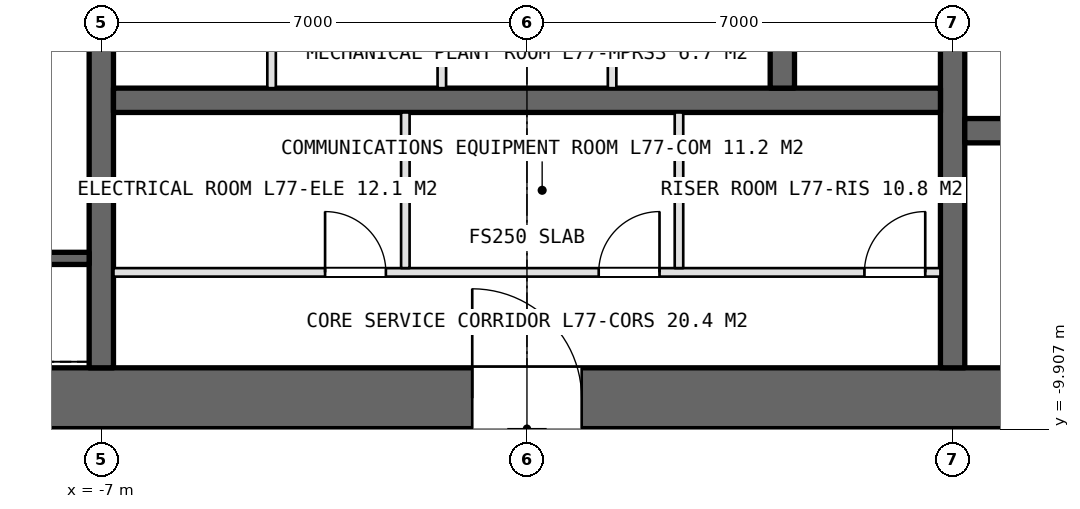
"""IFC4 building model, lengths in metres.
Left out: names, types, materials, properties, quantities, classifications, styles, units other than length and angle.
Written with IfcOpenShell. Run it as: python <this file> out.ifc"""

import sys

from ifc_helpers import new_model, si_unit, direction, frame, frame_2d, origin, place, context, subcontext, project, spatial, rectangle, extrude, element, fill, save


model = new_model("IFC4")
c1 = context("Model", 3, precision=1e-05, world=origin(), true_north=direction((0.0, 1.0)))
c2 = subcontext(c1, "Body", "Model", "MODEL_VIEW")
j1 = project(units=[si_unit("LENGTHUNIT", "METRE"), si_unit("PLANEANGLEUNIT", "RADIAN")], contexts=[c1])
p1 = place(None, origin())
s1 = spatial("IfcSite", under=j1, at=p1, CompositionType="ELEMENT")
p2 = place(p1, origin())
s2 = spatial("IfcBuilding", under=s1, at=p2, CompositionType="ELEMENT")
p3 = place(p2, frame((0.0, 0.0, 344.2)))
s3 = spatial("IfcBuildingStorey", under=s2, at=p3, CompositionType="ELEMENT", Elevation=344.2)
p4 = place(p3, frame((-13.9, -9.4, 0.0), z_axis=(0.0, 0.0, 1.0), x_axis=(1.0, 0.0, 0.0)))
e1 = element("IfcWall", 1, at=p4, inside=s3, PredefinedType="SHEAR", context=c2, shape_type="SweptSolid", body=[
    extrude(rectangle(XDim=27.8, YDim=1.0, at=frame_2d((13.9, 0.0))), origin(), (0.0, 0.0, 1.0), 5.0),
])
p5 = place(p4, frame((13.0, 0.0, 0.0)))
e2 = element("IfcOpeningElement", 2, at=p5, cuts=e1, PredefinedType="OPENING", context=c2, shape_type="SweptSolid", body=[
    extrude(rectangle(XDim=1.8, YDim=2.4, at=frame_2d((0.9, 1.2))), frame((0.0, 0.51, 0.0), z_axis=(0.0, -1.0, 0.0), x_axis=(1.0, 0.0, 0.0)), (0.0, 0.0, 1.0), 1.02),
])
p6 = place(p4, frame((22.95, 0.0, 0.0)))
e3 = element("IfcOpeningElement", 3, at=p6, cuts=e1, PredefinedType="OPENING", context=c2, shape_type="SweptSolid", body=[
    extrude(rectangle(XDim=2.2, YDim=2.7, at=frame_2d((1.1, 1.35))), frame((0.0, 0.51, 0.0), z_axis=(0.0, -1.0, 0.0), x_axis=(1.0, 0.0, 0.0)), (0.0, 0.0, 1.0), 1.02),
])
p7 = place(p3, frame((-7.0, -8.9, 0.0), z_axis=(0.0, 0.0, 1.0), x_axis=(0.0, 1.0, 0.0)))
e4 = element("IfcWall", 4, at=p7, inside=s3, PredefinedType="SHEAR", context=c2, shape_type="SweptSolid", body=[
    extrude(rectangle(XDim=17.8, YDim=0.4, at=frame_2d((8.9, 0.0))), origin(), (0.0, 0.0, 1.0), 5.0),
])
p8 = place(p7, frame((8.0, 0.0, 0.0)))
e5 = element("IfcOpeningElement", 5, at=p8, cuts=e4, PredefinedType="OPENING", context=c2, shape_type="SweptSolid", body=[
    extrude(rectangle(XDim=1.8, YDim=2.4, at=frame_2d((0.9, 1.2))), frame((0.0, 0.21, 0.0), z_axis=(0.0, -1.0, 0.0), x_axis=(1.0, 0.0, 0.0)), (0.0, 0.0, 1.0), 0.42),
])
p9 = place(p3, frame((7.0, -8.9, 0.0), z_axis=(0.0, 0.0, 1.0), x_axis=(0.0, 1.0, 0.0)))
e6 = element("IfcWall", 6, at=p9, inside=s3, PredefinedType="SHEAR", context=c2, shape_type="SweptSolid", body=[
    extrude(rectangle(XDim=17.8, YDim=0.4, at=frame_2d((8.9, 0.0))), origin(), (0.0, 0.0, 1.0), 5.0),
])
p10 = place(p9, frame((8.0, 0.0, 0.0)))
e7 = element("IfcOpeningElement", 7, at=p10, cuts=e6, PredefinedType="OPENING", context=c2, shape_type="SweptSolid", body=[
    extrude(rectangle(XDim=1.8, YDim=2.4, at=frame_2d((0.9, 1.2))), frame((0.0, 0.21, 0.0), z_axis=(0.0, -1.0, 0.0), x_axis=(1.0, 0.0, 0.0)), (0.0, 0.0, 1.0), 0.42),
])
p11 = place(p3, frame((-6.8, -4.5, 0.0), z_axis=(0.0, 0.0, 1.0), x_axis=(1.0, 0.0, 0.0)))
e8 = element("IfcWall", 8, at=p11, inside=s3, PredefinedType="SHEAR", context=c2, shape_type="SweptSolid", body=[
    extrude(rectangle(XDim=13.6, YDim=0.4, at=frame_2d((6.8, 0.0))), origin(), (0.0, 0.0, 1.0), 5.0),
])
p12 = place(p3, frame((7.2, -5.0, 0.0), z_axis=(0.0, 0.0, 1.0), x_axis=(1.0, 0.0, 0.0)))
e9 = element("IfcWall", 9, at=p12, inside=s3, PredefinedType="SHEAR", context=c2, shape_type="SweptSolid", body=[
    extrude(rectangle(XDim=5.7, YDim=0.4, at=frame_2d((2.85, 0.0))), origin(), (0.0, 0.0, 1.0), 5.0),
])
p13 = place(p3, frame((4.2, -4.3, 0.0), z_axis=(0.0, 0.0, 1.0), x_axis=(0.0, 1.0, 0.0)))
e10 = element("IfcWall", 10, at=p13, inside=s3, PredefinedType="SHEAR", context=c2, shape_type="SweptSolid", body=[
    extrude(rectangle(XDim=2.5, YDim=0.4, at=frame_2d((1.25, 0.0))), origin(), (0.0, 0.0, 1.0), 5.0),
])
p14 = place(p3, frame((-6.8, -7.33, 0.0), z_axis=(0.0, 0.0, 1.0), x_axis=(1.0, 0.0, 0.0)))
e11 = element("IfcWall", 11, at=p14, inside=s3, PredefinedType="PARTITIONING", context=c2, shape_type="SweptSolid", body=[
    extrude(rectangle(XDim=13.6, YDim=0.14, at=frame_2d((6.8, 0.0))), origin(), (0.0, 0.0, 1.0), 4.7),
])
p15 = place(p14, frame((3.48, 0.0, 0.0)))
e12 = element("IfcOpeningElement", 12, at=p15, cuts=e11, PredefinedType="OPENING", context=c2, shape_type="SweptSolid", body=[
    extrude(rectangle(XDim=1.0, YDim=2.4, at=frame_2d((0.5, 1.2))), frame((0.0, 0.08, 0.0), z_axis=(0.0, -1.0, 0.0), x_axis=(1.0, 0.0, 0.0)), (0.0, 0.0, 1.0), 0.16),
])
p16 = place(p14, frame((7.98, 0.0, 0.0)))
e13 = element("IfcOpeningElement", 13, at=p16, cuts=e11, PredefinedType="OPENING", context=c2, shape_type="SweptSolid", body=[
    extrude(rectangle(XDim=1.0, YDim=2.4, at=frame_2d((0.5, 1.2))), frame((0.0, 0.08, 0.0), z_axis=(0.0, -1.0, 0.0), x_axis=(1.0, 0.0, 0.0)), (0.0, 0.0, 1.0), 0.16),
])
p17 = place(p14, frame((12.35, 0.0, 0.0)))
e14 = element("IfcOpeningElement", 14, at=p17, cuts=e11, PredefinedType="OPENING", context=c2, shape_type="SweptSolid", body=[
    extrude(rectangle(XDim=1.0, YDim=2.4, at=frame_2d((0.5, 1.2))), frame((0.0, 0.08, 0.0), z_axis=(0.0, -1.0, 0.0), x_axis=(1.0, 0.0, 0.0)), (0.0, 0.0, 1.0), 0.16),
])
for number, where, z_axis, x_axis in (
    (15, (-2.0, -4.7, 0.0), (0.0, 0.0, 1.0), (0.0, -1.0, 0.0)),
    (16, (2.5, -4.7, 0.0), (0.0, 0.0, 1.0), (0.0, -1.0, 0.0)),
):
    element("IfcWall", number, at=place(p3, frame(where, z_axis=z_axis, x_axis=x_axis)), inside=s3, PredefinedType="PARTITIONING", context=c2, shape_type="SweptSolid", body=[
        extrude(rectangle(XDim=2.56, YDim=0.14, at=frame_2d((1.28, 0.0))), origin(), (0.0, 0.0, 1.0), 4.7),
    ])
for number, where, z_axis, x_axis in (
    (17, (-4.2, -1.8, 0.0), (0.0, 0.0, 1.0), (0.0, -1.0, 0.0)),
    (18, (-1.4, -1.8, 0.0), (0.0, 0.0, 1.0), (0.0, -1.0, 0.0)),
    (19, (1.4, -1.8, 0.0), (0.0, 0.0, 1.0), (0.0, -1.0, 0.0)),
):
    element("IfcWall", number, at=place(p3, frame(where, z_axis=z_axis, x_axis=x_axis)), inside=s3, PredefinedType="PARTITIONING", context=c2, shape_type="SweptSolid", body=[
        extrude(rectangle(XDim=2.5, YDim=0.14, at=frame_2d((1.25, 0.0))), origin(), (0.0, 0.0, 1.0), 4.7),
    ])
p18 = place(p3, frame((-9.15, -7.1, 0.0), z_axis=(0.0, 0.0, 1.0), x_axis=(1.0, 0.0, 0.0)))
e20 = element("IfcWall", 20, at=p18, inside=s3, PredefinedType="SOLIDWALL", context=c2, shape_type="SweptSolid", body=[
    extrude(rectangle(XDim=1.95, YDim=0.2, at=frame_2d((0.975, 0.0))), origin(), (0.0, 0.0, 1.0), 5.0),
])
p19 = place(p15, origin())
e21 = element("IfcDoor", 21, at=p19, inside=s3, OperationType="SINGLE_SWING_LEFT", PredefinedType="DOOR", context=c2, shape_type="SweptSolid", body=[
    extrude(rectangle(XDim=1.0, YDim=2.4, at=frame_2d((0.5, 1.2))), frame((0.0, 0.025, 0.0), z_axis=(0.0, -1.0, 0.0), x_axis=(1.0, 0.0, 0.0)), (0.0, 0.0, 1.0), 0.05),
])
fill(e12, e21)
p20 = place(p16, origin())
e22 = element("IfcDoor", 22, at=p20, inside=s3, OperationType="SINGLE_SWING_RIGHT", PredefinedType="DOOR", context=c2, shape_type="SweptSolid", body=[
    extrude(rectangle(XDim=1.0, YDim=2.4, at=frame_2d((0.5, 1.2))), frame((0.0, 0.025, 0.0), z_axis=(0.0, -1.0, 0.0), x_axis=(1.0, 0.0, 0.0)), (0.0, 0.0, 1.0), 0.05),
])
fill(e13, e22)
p21 = place(p17, origin())
e23 = element("IfcDoor", 23, at=p21, inside=s3, OperationType="SINGLE_SWING_RIGHT", PredefinedType="DOOR", context=c2, shape_type="SweptSolid", body=[
    extrude(rectangle(XDim=1.0, YDim=2.4, at=frame_2d((0.5, 1.2))), frame((0.0, 0.025, 0.0), z_axis=(0.0, -1.0, 0.0), x_axis=(1.0, 0.0, 0.0)), (0.0, 0.0, 1.0), 0.05),
])
fill(e14, e23)
p22 = place(p5, origin())
e24 = element("IfcDoor", 24, at=p22, inside=s3, OperationType="DOUBLE_DOOR_SINGLE_SWING", PredefinedType="DOOR", context=c2, shape_type="SweptSolid", body=[
    extrude(rectangle(XDim=1.8, YDim=2.4, at=frame_2d((0.9, 1.2))), frame((0.0, 0.025, 0.0), z_axis=(0.0, -1.0, 0.0), x_axis=(1.0, 0.0, 0.0)), (0.0, 0.0, 1.0), 0.05),
])
fill(e2, e24)
save(model, sys.argv[1])
